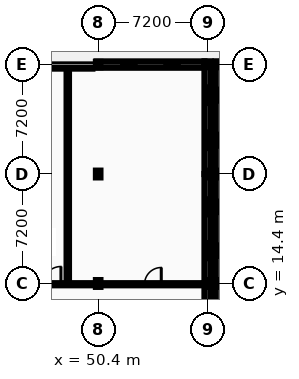
"""IFC4 building model, lengths in metres.
Left out: names, types, materials, properties, quantities, classifications, styles, units other than length and angle.
Written with IfcOpenShell. Run it as: python <this file> out.ifc"""

import sys

from ifc_helpers import new_model, si_unit, direction, frame, frame_2d, origin, origin_2d, place, context, subcontext, project, spatial, rectangle, i_section, extrude, element, fill, save


model = new_model("IFC4")
c1 = context("Model", 3, precision=1e-05, world=origin(), true_north=direction((0.0, 1.0)))
c2 = subcontext(c1, "Body", "Model", "MODEL_VIEW")
j1 = project(units=[si_unit("LENGTHUNIT", "METRE"), si_unit("PLANEANGLEUNIT", "RADIAN")], contexts=[c1])
p1 = place(None, origin())
s1 = spatial("IfcSite", under=j1, at=p1, CompositionType="ELEMENT")
p2 = place(p1, origin())
s2 = spatial("IfcBuilding", under=s1, at=p2, CompositionType="ELEMENT")
p3 = place(p2, origin())
s3 = spatial("IfcBuildingStorey", under=s2, at=p3, CompositionType="ELEMENT", Elevation=0.0)
for number, where, z_axis, x_axis in (
    (1, (50.4, 14.4, 0.0), (0.0, 0.0, 1.0), (1.0, 0.0, 0.0)),
    (2, (50.4, 21.6, 0.0), (0.0, 0.0, 1.0), (1.0, 0.0, 0.0)),
):
    element("IfcColumn", number, at=place(p3, frame(where, z_axis=z_axis, x_axis=x_axis)), inside=s3, PredefinedType="COLUMN", context=c2, shape_type="SweptSolid", body=[
        extrude(i_section(OverallWidth=0.3, OverallDepth=0.45, WebThickness=0.014, FlangeThickness=0.026, FilletRadius=0.027, at=origin_2d()), origin(), (0.0, 0.0, 1.0), 5.2),
    ])
p4 = place(p3, frame((50.4, 28.8, 0.0), z_axis=(0.0, 0.0, 1.0), x_axis=(1.0, 0.0, 0.0)))
e3 = element("IfcColumn", 3, at=p4, inside=s3, PredefinedType="COLUMN", context=c2, shape_type="SweptSolid", body=[
    extrude(i_section(OverallWidth=0.3, OverallDepth=0.36, WebThickness=0.012, FlangeThickness=0.022, FilletRadius=0.027, at=origin_2d()), origin(), (0.0, 0.0, 1.0), 5.2),
])
for number, where, z_axis, x_axis in (
    (4, (57.6, 14.4, 0.0), (0.0, 0.0, 1.0), (1.0, 0.0, 0.0)),
    (5, (57.6, 21.6, 0.0), (0.0, 0.0, 1.0), (1.0, 0.0, 0.0)),
):
    element("IfcColumn", number, at=place(p3, frame(where, z_axis=z_axis, x_axis=x_axis)), inside=s3, PredefinedType="COLUMN", context=c2, shape_type="SweptSolid", body=[
        extrude(i_section(OverallWidth=0.3, OverallDepth=0.45, WebThickness=0.014, FlangeThickness=0.026, FilletRadius=0.027, at=origin_2d()), origin(), (0.0, 0.0, 1.0), 5.2),
    ])
p5 = place(p3, frame((57.6, 28.8, 0.0), z_axis=(0.0, 0.0, 1.0), x_axis=(1.0, 0.0, 0.0)))
e6 = element("IfcColumn", 6, at=p5, inside=s3, PredefinedType="COLUMN", context=c2, shape_type="SweptSolid", body=[
    extrude(i_section(OverallWidth=0.3, OverallDepth=0.36, WebThickness=0.012, FlangeThickness=0.022, FilletRadius=0.027, at=origin_2d()), origin(), (0.0, 0.0, 1.0), 5.2),
])
for number, where, z_axis, x_axis in (
    (7, (58.32, 14.4, 0.0), (0.0, 0.0, 1.0), (1.0, 0.0, 0.0)),
    (8, (58.32, 21.6, 0.0), (0.0, 0.0, 1.0), (1.0, 0.0, 0.0)),
):
    element("IfcColumn", number, at=place(p3, frame(where, z_axis=z_axis, x_axis=x_axis)), inside=s3, PredefinedType="COLUMN", context=c2, shape_type="SweptSolid", body=[
        extrude(i_section(OverallWidth=0.3, OverallDepth=0.45, WebThickness=0.014, FlangeThickness=0.026, FilletRadius=0.027, at=origin_2d()), origin(), (0.0, 0.0, 1.0), 5.2),
    ])
p6 = place(p3, frame((58.32, 28.8, 0.0), z_axis=(0.0, 0.0, 1.0), x_axis=(1.0, 0.0, 0.0)))
e9 = element("IfcColumn", 9, at=p6, inside=s3, PredefinedType="COLUMN", context=c2, shape_type="SweptSolid", body=[
    extrude(i_section(OverallWidth=0.3, OverallDepth=0.36, WebThickness=0.012, FlangeThickness=0.022, FilletRadius=0.027, at=origin_2d()), origin(), (0.0, 0.0, 1.0), 5.2),
])
p7 = place(p3, frame((57.39, 28.8, 0.0), z_axis=(0.0, 0.0, 1.0), x_axis=(-1.0, 0.0, 0.0)))
e10 = element("IfcWall", 10, at=p7, inside=s3, PredefinedType="STANDARD", context=c2, shape_type="SweptSolid", body=[
    extrude(rectangle(XDim=7.1, YDim=0.42, at=frame_2d((3.55, 0.0))), origin(), (0.0, 0.0, 1.0), 4.665),
])
p8 = place(p7, frame((1.649, 0.0, 0.95)))
e11 = element("IfcOpeningElement", 11, at=p8, cuts=e10, PredefinedType="OPENING", context=c2, shape_type="SweptSolid", body=[
    extrude(rectangle(XDim=0.962, YDim=1.296, at=frame_2d((0.481, 0.648))), frame((0.0, 0.22, 0.0), z_axis=(0.0, -1.0, 0.0), x_axis=(1.0, 0.0, 0.0)), (0.0, 0.0, 1.0), 0.44),
])
p9 = place(p7, frame((4.489, 0.0, 0.95)))
e12 = element("IfcOpeningElement", 12, at=p9, cuts=e10, PredefinedType="OPENING", context=c2, shape_type="SweptSolid", body=[
    extrude(rectangle(XDim=0.962, YDim=1.296, at=frame_2d((0.481, 0.648))), frame((0.0, 0.22, 0.0), z_axis=(0.0, -1.0, 0.0), x_axis=(1.0, 0.0, 0.0)), (0.0, 0.0, 1.0), 0.44),
])
p10 = place(p3, frame((57.6, 8.9, 0.0), z_axis=(0.0, 0.0, 1.0), x_axis=(0.0, 1.0, 0.0)))
e13 = element("IfcWall", 13, at=p10, inside=s3, PredefinedType="STANDARD", context=c2, shape_type="SweptSolid", body=[
    extrude(rectangle(XDim=5.5, YDim=0.42, at=frame_2d((2.75, 0.0))), origin(), (0.0, 0.0, 1.0), 4.97),
])
p11 = place(p3, frame((57.6, 14.4, 0.0), z_axis=(0.0, 0.0, 1.0), x_axis=(0.0, 1.0, 0.0)))
e14 = element("IfcWall", 14, at=p11, inside=s3, PredefinedType="STANDARD", context=c2, shape_type="SweptSolid", body=[
    extrude(rectangle(XDim=7.2, YDim=0.42, at=frame_2d((3.6, 0.0))), origin(), (0.0, 0.0, 1.0), 4.665),
])
p12 = place(p11, frame((1.56, 0.0, 0.95)))
e15 = element("IfcOpeningElement", 15, at=p12, cuts=e14, PredefinedType="OPENING", context=c2, shape_type="SweptSolid", body=[
    extrude(rectangle(XDim=1.2, YDim=1.296, at=frame_2d((0.6, 0.648))), frame((0.0, 0.22, 0.0), z_axis=(0.0, -1.0, 0.0), x_axis=(1.0, 0.0, 0.0)), (0.0, 0.0, 1.0), 0.44),
])
p13 = place(p11, frame((4.44, 0.0, 0.95)))
e16 = element("IfcOpeningElement", 16, at=p13, cuts=e14, PredefinedType="OPENING", context=c2, shape_type="SweptSolid", body=[
    extrude(rectangle(XDim=1.2, YDim=1.296, at=frame_2d((0.6, 0.648))), frame((0.0, 0.22, 0.0), z_axis=(0.0, -1.0, 0.0), x_axis=(1.0, 0.0, 0.0)), (0.0, 0.0, 1.0), 0.44),
])
p14 = place(p3, frame((57.6, 21.6, 0.0), z_axis=(0.0, 0.0, 1.0), x_axis=(0.0, 1.0, 0.0)))
e17 = element("IfcWall", 17, at=p14, inside=s3, PredefinedType="STANDARD", context=c2, shape_type="SweptSolid", body=[
    extrude(rectangle(XDim=7.41, YDim=0.42, at=frame_2d((3.705, 0.0))), origin(), (0.0, 0.0, 1.0), 4.665),
])
p15 = place(p14, frame((1.606, 0.0, 0.95)))
e18 = element("IfcOpeningElement", 18, at=p15, cuts=e17, PredefinedType="OPENING", context=c2, shape_type="SweptSolid", body=[
    extrude(rectangle(XDim=1.234, YDim=1.296, at=frame_2d((0.617, 0.648))), frame((0.0, 0.22, 0.0), z_axis=(0.0, -1.0, 0.0), x_axis=(1.0, 0.0, 0.0)), (0.0, 0.0, 1.0), 0.44),
])
p16 = place(p14, frame((4.57, 0.0, 0.95)))
e19 = element("IfcOpeningElement", 19, at=p16, cuts=e17, PredefinedType="OPENING", context=c2, shape_type="SweptSolid", body=[
    extrude(rectangle(XDim=1.234, YDim=1.296, at=frame_2d((0.617, 0.648))), frame((0.0, 0.22, 0.0), z_axis=(0.0, -1.0, 0.0), x_axis=(1.0, 0.0, 0.0)), (0.0, 0.0, 1.0), 0.44),
])
p17 = place(p3, frame((58.32, 14.4, 0.0), z_axis=(0.0, 0.0, 1.0), x_axis=(0.0, -1.0, 0.0)))
e20 = element("IfcWall", 20, at=p17, inside=s3, PredefinedType="STANDARD", context=c2, shape_type="SweptSolid", body=[
    extrude(rectangle(XDim=5.5, YDim=0.42, at=frame_2d((2.75, 0.0))), origin(), (0.0, 0.0, 1.0), 4.97),
])
p18 = place(p3, frame((58.32, 21.6, 0.0), z_axis=(0.0, 0.0, 1.0), x_axis=(0.0, -1.0, 0.0)))
e21 = element("IfcWall", 21, at=p18, inside=s3, PredefinedType="STANDARD", context=c2, shape_type="SweptSolid", body=[
    extrude(rectangle(XDim=7.2, YDim=0.42, at=frame_2d((3.6, 0.0))), origin(), (0.0, 0.0, 1.0), 4.665),
])
p19 = place(p18, frame((1.713, 0.0, 0.95)))
e22 = element("IfcOpeningElement", 22, at=p19, cuts=e21, PredefinedType="OPENING", context=c2, shape_type="SweptSolid", body=[
    extrude(rectangle(XDim=0.894, YDim=1.26, at=frame_2d((0.447, 0.63))), frame((0.0, 0.22, 0.0), z_axis=(0.0, -1.0, 0.0), x_axis=(1.0, 0.0, 0.0)), (0.0, 0.0, 1.0), 0.44),
])
p20 = place(p18, frame((4.593, 0.0, 0.95)))
e23 = element("IfcOpeningElement", 23, at=p20, cuts=e21, PredefinedType="OPENING", context=c2, shape_type="SweptSolid", body=[
    extrude(rectangle(XDim=0.894, YDim=1.26, at=frame_2d((0.447, 0.63))), frame((0.0, 0.22, 0.0), z_axis=(0.0, -1.0, 0.0), x_axis=(1.0, 0.0, 0.0)), (0.0, 0.0, 1.0), 0.44),
])
p21 = place(p3, frame((58.32, 29.01, 0.0), z_axis=(0.0, 0.0, 1.0), x_axis=(0.0, -1.0, 0.0)))
e24 = element("IfcWall", 24, at=p21, inside=s3, PredefinedType="STANDARD", context=c2, shape_type="SweptSolid", body=[
    extrude(rectangle(XDim=7.41, YDim=0.42, at=frame_2d((3.705, 0.0))), origin(), (0.0, 0.0, 1.0), 4.665),
])
p22 = place(p21, frame((1.759, 0.0, 0.95)))
e25 = element("IfcOpeningElement", 25, at=p22, cuts=e24, PredefinedType="OPENING", context=c2, shape_type="SweptSolid", body=[
    extrude(rectangle(XDim=0.928, YDim=1.26, at=frame_2d((0.464, 0.63))), frame((0.0, 0.22, 0.0), z_axis=(0.0, -1.0, 0.0), x_axis=(1.0, 0.0, 0.0)), (0.0, 0.0, 1.0), 0.44),
])
p23 = place(p21, frame((4.723, 0.0, 0.95)))
e26 = element("IfcOpeningElement", 26, at=p23, cuts=e24, PredefinedType="OPENING", context=c2, shape_type="SweptSolid", body=[
    extrude(rectangle(XDim=0.928, YDim=1.26, at=frame_2d((0.464, 0.63))), frame((0.0, 0.22, 0.0), z_axis=(0.0, -1.0, 0.0), x_axis=(1.0, 0.0, 0.0)), (0.0, 0.0, 1.0), 0.44),
])
p24 = place(p3, frame((43.58, 14.35, 0.0), z_axis=(0.0, 0.0, 1.0), x_axis=(1.0, 0.0, 0.0)))
e27 = element("IfcWall", 27, at=p24, inside=s3, PredefinedType="PARTITIONING", context=c2, shape_type="SweptSolid", body=[
    extrude(rectangle(XDim=6.44, YDim=0.142, at=frame_2d((3.22, 0.0))), origin(), (0.0, 0.0, 1.0), 4.665),
])
p25 = place(p24, frame((3.204, 0.0, 0.0)))
e28 = element("IfcOpeningElement", 28, at=p25, cuts=e27, PredefinedType="OPENING", context=c2, shape_type="SweptSolid", body=[
    extrude(rectangle(XDim=1.166, YDim=2.068, at=frame_2d((0.583, 1.034))), frame((0.0, 0.081, 0.0), z_axis=(0.0, -1.0, 0.0), x_axis=(1.0, 0.0, 0.0)), (0.0, 0.0, 1.0), 0.162),
])
p26 = place(p3, frame((50.78, 14.35, 0.0), z_axis=(0.0, 0.0, 1.0), x_axis=(1.0, 0.0, 0.0)))
e29 = element("IfcWall", 29, at=p26, inside=s3, PredefinedType="PARTITIONING", context=c2, shape_type="SweptSolid", body=[
    extrude(rectangle(XDim=6.44, YDim=0.142, at=frame_2d((3.22, 0.0))), origin(), (0.0, 0.0, 1.0), 4.665),
])
p27 = place(p26, frame((2.67, 0.0, 0.0)))
e30 = element("IfcOpeningElement", 30, at=p27, cuts=e29, PredefinedType="OPENING", context=c2, shape_type="SweptSolid", body=[
    extrude(rectangle(XDim=1.1, YDim=2.15, at=frame_2d((0.55, 1.075))), frame((0.0, 0.081, 0.0), z_axis=(0.0, -1.0, 0.0), x_axis=(1.0, 0.0, 0.0)), (0.0, 0.0, 1.0), 0.162),
])
p28 = place(p3, frame((43.58, 28.6, 0.0), z_axis=(0.0, 0.0, 1.0), x_axis=(1.0, 0.0, 0.0)))
e31 = element("IfcWall", 31, at=p28, inside=s3, PredefinedType="PARTITIONING", context=c2, shape_type="SweptSolid", body=[
    extrude(rectangle(XDim=6.44, YDim=0.135, at=frame_2d((3.22, 0.0))), origin(), (0.0, 0.0, 1.0), 4.665),
])
p29 = place(p3, frame((48.4, 14.421, 0.0), z_axis=(0.0, 0.0, 1.0), x_axis=(0.0, 1.0, 0.0)))
e32 = element("IfcWall", 32, at=p29, inside=s3, PredefinedType="PARTITIONING", context=c2, shape_type="SweptSolid", body=[
    extrude(rectangle(XDim=14.112, YDim=0.16, at=frame_2d((7.056, 0.0))), origin(), (0.0, 0.0, 1.0), 4.97),
])
p30 = place(p8, origin())
e33 = element("IfcWindow", 33, at=p30, inside=s3, PartitioningType="SINGLE_PANEL", PredefinedType="WINDOW", context=c2, shape_type="SweptSolid", body=[
    extrude(rectangle(XDim=0.962, YDim=1.296, at=frame_2d((0.481, 0.648))), frame((0.0, 0.03, 0.0), z_axis=(0.0, -1.0, 0.0), x_axis=(1.0, 0.0, 0.0)), (0.0, 0.0, 1.0), 0.06),
])
fill(e11, e33)
p31 = place(p9, origin())
e34 = element("IfcWindow", 34, at=p31, inside=s3, PartitioningType="SINGLE_PANEL", PredefinedType="WINDOW", context=c2, shape_type="SweptSolid", body=[
    extrude(rectangle(XDim=0.962, YDim=1.296, at=frame_2d((0.481, 0.648))), frame((0.0, 0.03, 0.0), z_axis=(0.0, -1.0, 0.0), x_axis=(1.0, 0.0, 0.0)), (0.0, 0.0, 1.0), 0.06),
])
fill(e12, e34)
p32 = place(p12, origin())
e35 = element("IfcWindow", 35, at=p32, inside=s3, PartitioningType="SINGLE_PANEL", PredefinedType="WINDOW", context=c2, shape_type="SweptSolid", body=[
    extrude(rectangle(XDim=1.2, YDim=1.296, at=frame_2d((0.6, 0.648))), frame((0.0, 0.03, 0.0), z_axis=(0.0, -1.0, 0.0), x_axis=(1.0, 0.0, 0.0)), (0.0, 0.0, 1.0), 0.06),
])
fill(e15, e35)
p33 = place(p13, origin())
e36 = element("IfcWindow", 36, at=p33, inside=s3, PartitioningType="SINGLE_PANEL", PredefinedType="WINDOW", context=c2, shape_type="SweptSolid", body=[
    extrude(rectangle(XDim=1.2, YDim=1.296, at=frame_2d((0.6, 0.648))), frame((0.0, 0.03, 0.0), z_axis=(0.0, -1.0, 0.0), x_axis=(1.0, 0.0, 0.0)), (0.0, 0.0, 1.0), 0.06),
])
fill(e16, e36)
p34 = place(p15, origin())
e37 = element("IfcWindow", 37, at=p34, inside=s3, PartitioningType="SINGLE_PANEL", PredefinedType="WINDOW", context=c2, shape_type="SweptSolid", body=[
    extrude(rectangle(XDim=1.234, YDim=1.296, at=frame_2d((0.617, 0.648))), frame((0.0, 0.03, 0.0), z_axis=(0.0, -1.0, 0.0), x_axis=(1.0, 0.0, 0.0)), (0.0, 0.0, 1.0), 0.06),
])
fill(e18, e37)
p35 = place(p16, origin())
e38 = element("IfcWindow", 38, at=p35, inside=s3, PartitioningType="SINGLE_PANEL", PredefinedType="WINDOW", context=c2, shape_type="SweptSolid", body=[
    extrude(rectangle(XDim=1.234, YDim=1.296, at=frame_2d((0.617, 0.648))), frame((0.0, 0.03, 0.0), z_axis=(0.0, -1.0, 0.0), x_axis=(1.0, 0.0, 0.0)), (0.0, 0.0, 1.0), 0.06),
])
fill(e19, e38)
p36 = place(p19, origin())
e39 = element("IfcWindow", 39, at=p36, inside=s3, PartitioningType="SINGLE_PANEL", PredefinedType="WINDOW", context=c2, shape_type="SweptSolid", body=[
    extrude(rectangle(XDim=0.894, YDim=1.26, at=frame_2d((0.447, 0.63))), frame((0.0, 0.03, 0.0), z_axis=(0.0, -1.0, 0.0), x_axis=(1.0, 0.0, 0.0)), (0.0, 0.0, 1.0), 0.06),
])
fill(e22, e39)
p37 = place(p20, origin())
e40 = element("IfcWindow", 40, at=p37, inside=s3, PartitioningType="SINGLE_PANEL", PredefinedType="WINDOW", context=c2, shape_type="SweptSolid", body=[
    extrude(rectangle(XDim=0.894, YDim=1.26, at=frame_2d((0.447, 0.63))), frame((0.0, 0.03, 0.0), z_axis=(0.0, -1.0, 0.0), x_axis=(1.0, 0.0, 0.0)), (0.0, 0.0, 1.0), 0.06),
])
fill(e23, e40)
p38 = place(p22, origin())
e41 = element("IfcWindow", 41, at=p38, inside=s3, PartitioningType="SINGLE_PANEL", PredefinedType="WINDOW", context=c2, shape_type="SweptSolid", body=[
    extrude(rectangle(XDim=0.928, YDim=1.26, at=frame_2d((0.464, 0.63))), frame((0.0, 0.03, 0.0), z_axis=(0.0, -1.0, 0.0), x_axis=(1.0, 0.0, 0.0)), (0.0, 0.0, 1.0), 0.06),
])
fill(e25, e41)
p39 = place(p23, origin())
e42 = element("IfcWindow", 42, at=p39, inside=s3, PartitioningType="SINGLE_PANEL", PredefinedType="WINDOW", context=c2, shape_type="SweptSolid", body=[
    extrude(rectangle(XDim=0.928, YDim=1.26, at=frame_2d((0.464, 0.63))), frame((0.0, 0.03, 0.0), z_axis=(0.0, -1.0, 0.0), x_axis=(1.0, 0.0, 0.0)), (0.0, 0.0, 1.0), 0.06),
])
fill(e26, e42)
p40 = place(p25, frame((1.166, 0.0, 0.0), z_axis=(0.0, 0.0, 1.0), x_axis=(-1.0, 0.0, 0.0)))
e43 = element("IfcDoor", 43, at=p40, inside=s3, OperationType="SINGLE_SWING_RIGHT", PredefinedType="DOOR", context=c2, shape_type="SweptSolid", body=[
    extrude(rectangle(XDim=1.166, YDim=2.068, at=frame_2d((0.583, 1.034))), frame((0.0, 0.025, 0.0), z_axis=(0.0, -1.0, 0.0), x_axis=(1.0, 0.0, 0.0)), (0.0, 0.0, 1.0), 0.05),
])
fill(e28, e43)
p41 = place(p27, frame((1.1, 0.0, 0.0), z_axis=(0.0, 0.0, 1.0), x_axis=(-1.0, 0.0, 0.0)))
e44 = element("IfcDoor", 44, at=p41, inside=s3, OperationType="SINGLE_SWING_RIGHT", PredefinedType="DOOR", context=c2, shape_type="SweptSolid", body=[
    extrude(rectangle(XDim=1.1, YDim=2.15, at=frame_2d((0.55, 1.075))), frame((0.0, 0.025, 0.0), z_axis=(0.0, -1.0, 0.0), x_axis=(1.0, 0.0, 0.0)), (0.0, 0.0, 1.0), 0.05),
])
fill(e30, e44)
save(model, sys.argv[1])
